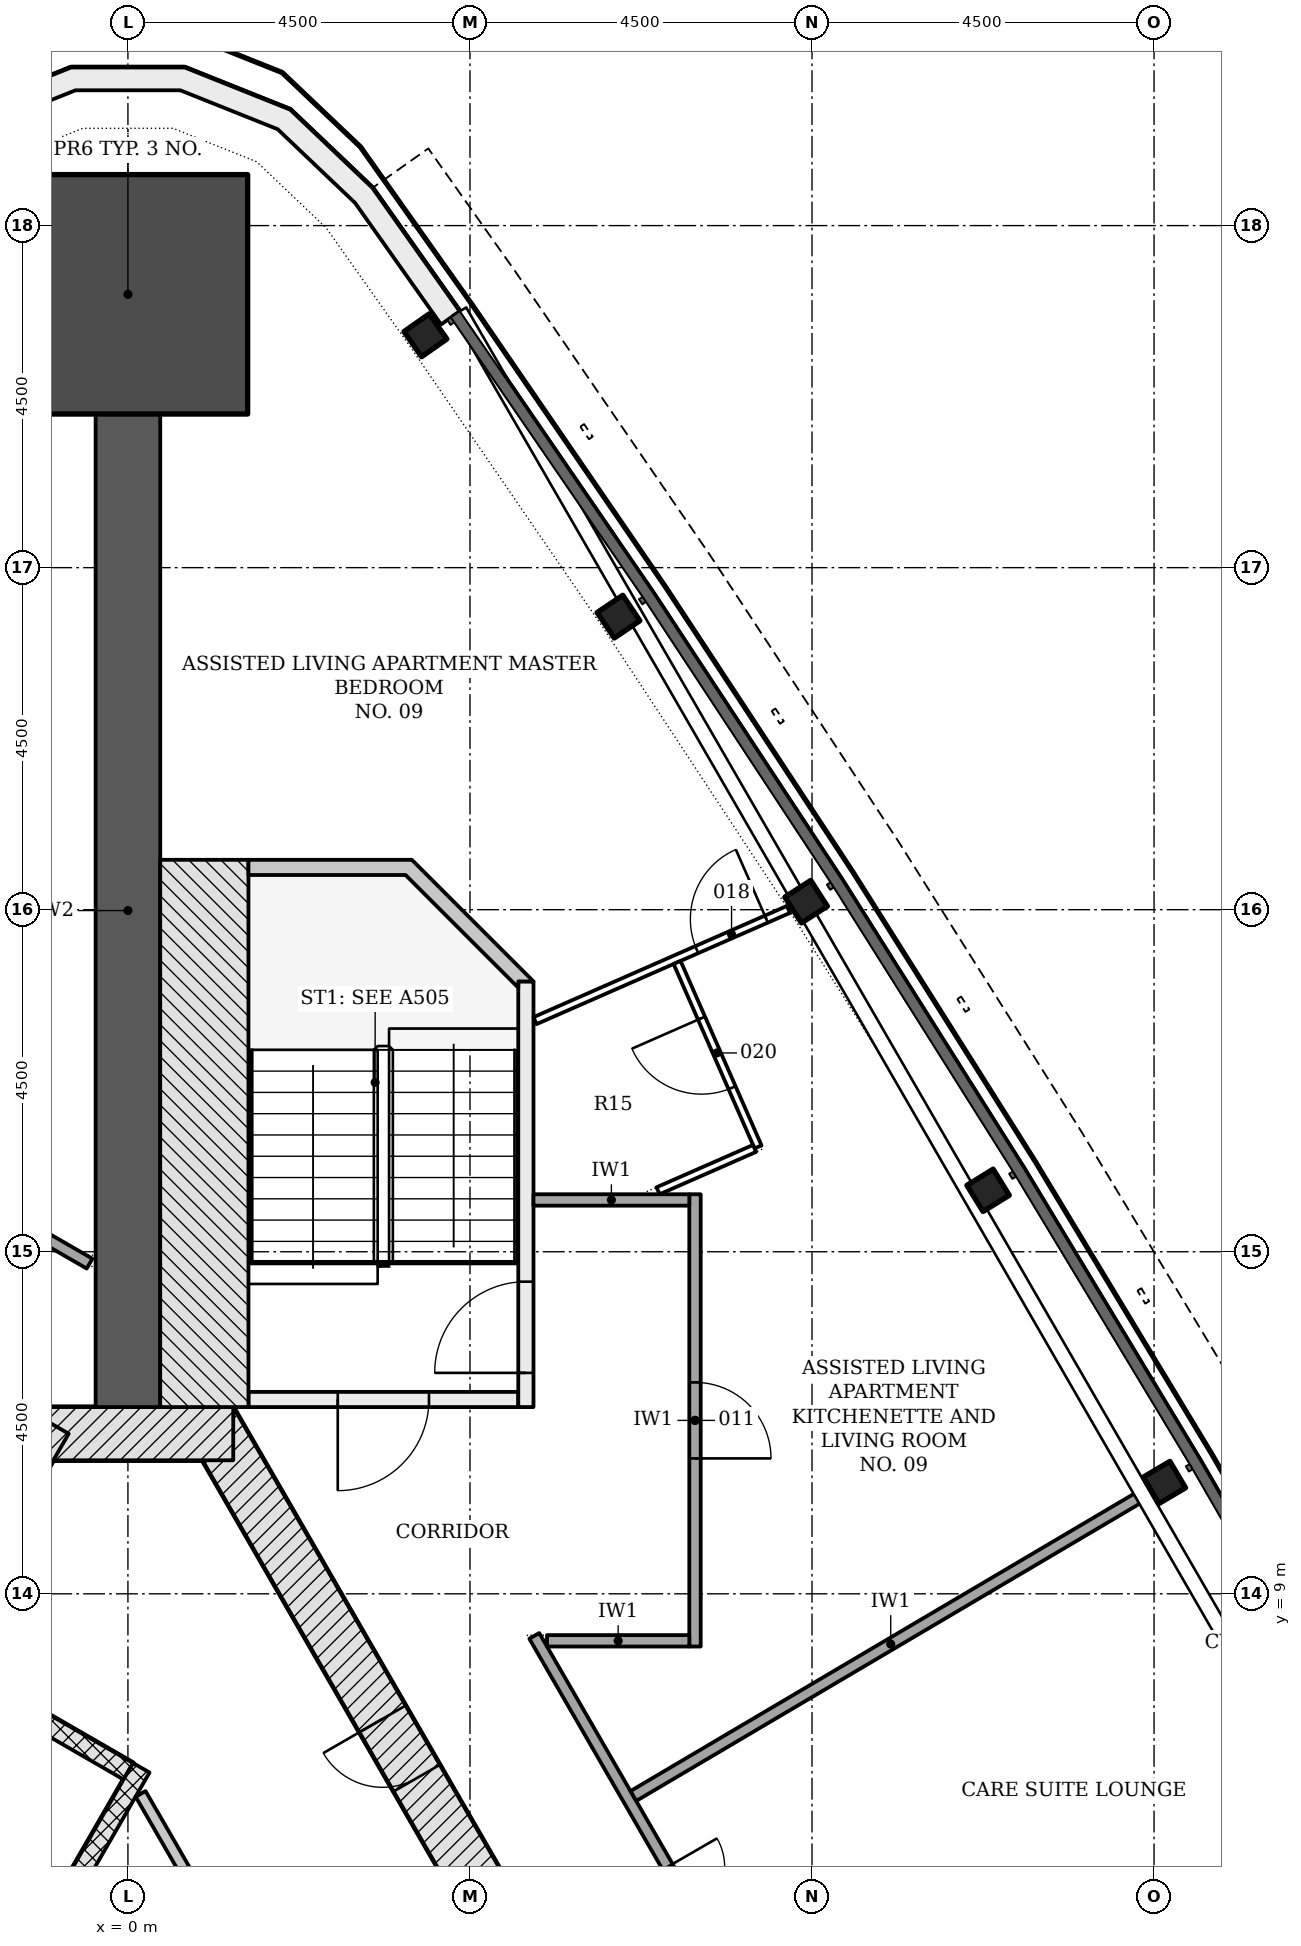
"""IFC4 building model, lengths in metres.
Left out: names, types, materials, properties, quantities, classifications, styles, units other than length and angle.
Written with IfcOpenShell. Run it as: python <this file> out.ifc"""

import sys

from ifc_helpers import new_model, si_unit, direction, frame, frame_2d, origin, origin_2d, place, context, subcontext, project, spatial, polyline, rectangle, i_section, outline, extrude, element, fill, save


model = new_model("IFC4")
c1 = context("Model", 3, precision=1e-05, world=origin(), true_north=direction((0.0, 1.0)))
c2 = subcontext(c1, "Body", "Model", "MODEL_VIEW")
j1 = project(units=[si_unit("LENGTHUNIT", "METRE"), si_unit("PLANEANGLEUNIT", "RADIAN")], contexts=[c1])
p1 = place(None, origin())
s1 = spatial("IfcSite", under=j1, at=p1, CompositionType="ELEMENT")
p2 = place(p1, origin())
s2 = spatial("IfcBuilding", under=s1, at=p2, CompositionType="ELEMENT")
p3 = place(p2, frame((0.0, 0.0, 79.8)))
s3 = spatial("IfcBuildingStorey", under=s2, at=p3, CompositionType="ELEMENT", Elevation=79.8)
p4 = place(p3, frame((10.311, -4.703, -0.2), z_axis=(0.0, 0.0, 1.0), x_axis=(-0.500001446645, 0.866024568562, 0.0)))
e1 = element("IfcWall", 1, at=p4, inside=s3, PredefinedType="SHEAR", context=c2, shape_type="SweptSolid", body=[
    extrude(rectangle(XDim=18.458, YDim=0.7, at=frame_2d((9.229, 0.0))), origin(), (0.0, 0.0, 1.0), 3.6),
])
p5 = place(p4, frame((5.9, 0.0, 0.2)))
e2 = element("IfcOpeningElement", 2, at=p5, cuts=e1, PredefinedType="OPENING", context=c2, shape_type="SweptSolid", body=[
    extrude(rectangle(XDim=1.0, YDim=2.1, at=frame_2d((0.5, 1.05))), frame((0.0, 0.36, 0.0), z_axis=(0.0, -1.0, 0.0), x_axis=(1.0, 0.0, 0.0)), (0.0, 0.0, 1.0), 0.72),
])
p6 = place(p4, frame((1.452, 0.0, 0.2)))
e3 = element("IfcOpeningElement", 3, at=p6, cuts=e1, PredefinedType="OPENING", context=c2, shape_type="SweptSolid", body=[
    extrude(rectangle(XDim=0.9, YDim=2.1, at=frame_2d((0.45, 1.05))), frame((0.0, 0.36, 0.0), z_axis=(0.0, -1.0, 0.0), x_axis=(1.0, 0.0, 0.0)), (0.0, 0.0, 1.0), 0.72),
])
p7 = place(p4, frame((4.396, 0.0, 0.2)))
e4 = element("IfcOpeningElement", 4, at=p7, cuts=e1, PredefinedType="OPENING", context=c2, shape_type="SweptSolid", body=[
    extrude(rectangle(XDim=0.9, YDim=2.1, at=frame_2d((0.45, 1.05))), frame((0.0, 0.36, 0.0), z_axis=(0.0, -1.0, 0.0), x_axis=(1.0, 0.0, 0.0)), (0.0, 0.0, 1.0), 0.72),
])
p8 = place(p4, frame((13.023, 0.0, 0.2)))
e5 = element("IfcOpeningElement", 5, at=p8, cuts=e1, PredefinedType="OPENING", context=c2, shape_type="SweptSolid", body=[
    extrude(rectangle(XDim=0.9, YDim=2.1, at=frame_2d((0.45, 1.05))), frame((0.0, 0.36, 0.0), z_axis=(0.0, -1.0, 0.0), x_axis=(1.0, 0.0, 0.0)), (0.0, 0.0, 1.0), 0.72),
])
p9 = place(p3, frame((1.386, 11.106, -0.2), z_axis=(0.0, 0.0, 1.0), x_axis=(-1.0, 0.0, 0.0)))
e6 = element("IfcWall", 6, at=p9, inside=s3, PredefinedType="SHEAR", context=c2, shape_type="SweptSolid", body=[
    extrude(rectangle(XDim=2.771, YDim=0.7, at=frame_2d((1.386, 0.0))), origin(), (0.0, 0.0, 1.0), 3.6),
])
p10 = place(p3, frame((-1.083, 11.281, -0.2), z_axis=(0.0, 0.0, 1.0), x_axis=(-0.500001446645, -0.866024568562, 0.0)))
e7 = element("IfcWall", 7, at=p10, inside=s3, PredefinedType="SHEAR", context=c2, shape_type="SweptSolid", body=[
    extrude(rectangle(XDim=18.458, YDim=0.7, at=frame_2d((9.229, 0.0))), origin(), (0.0, 0.0, 1.0), 3.6),
])
p11 = place(p10, frame((8.979, 0.0, 0.2)))
e8 = element("IfcOpeningElement", 8, at=p11, cuts=e7, PredefinedType="OPENING", context=c2, shape_type="SweptSolid", body=[
    extrude(rectangle(XDim=1.2, YDim=2.1, at=frame_2d((0.6, 1.05))), frame((0.0, 0.36, 0.0), z_axis=(0.0, -1.0, 0.0), x_axis=(1.0, 0.0, 0.0)), (0.0, 0.0, 1.0), 0.72),
])
p12 = place(p10, frame((11.029, 0.0, 0.2)))
e9 = element("IfcOpeningElement", 9, at=p12, cuts=e7, PredefinedType="OPENING", context=c2, shape_type="SweptSolid", body=[
    extrude(rectangle(XDim=1.2, YDim=2.1, at=frame_2d((0.6, 1.05))), frame((0.0, 0.36, 0.0), z_axis=(0.0, -1.0, 0.0), x_axis=(1.0, 0.0, 0.0)), (0.0, 0.0, 1.0), 0.72),
])
p13 = place(p3, frame((0.0, 11.456, -0.2), z_axis=(0.0, 0.0, 1.0), x_axis=(0.0, 1.0, 0.0)))
e10 = element("IfcWall", 10, at=p13, inside=s3, PredefinedType="SHEAR", context=c2, shape_type="SweptSolid", body=[
    extrude(rectangle(XDim=13.065, YDim=0.85, at=frame_2d((6.532, 0.0))), origin(), (0.0, 0.0, 1.0), 3.6),
])
p14 = place(p3, frame((0.0, 26.096, -0.2), z_axis=(0.0, 0.0, 1.0), x_axis=(0.0, 1.0, 0.0)))
e11 = element("IfcColumn", 11, at=p14, inside=s3, PredefinedType="COLUMN", context=c2, shape_type="SweptSolid", body=[
    extrude(rectangle(XDim=3.15, YDim=3.15, at=origin_2d()), origin(), (0.0, 0.0, 1.0), 3.6),
])
for number, where, z_axis, x_axis in (
    (12, (13.636, 10.465, -0.2), (0.0, 0.0, 1.0), (-0.508, 0.861, 0.0)),
    (13, (11.316, 14.308, -0.2), (0.0, 0.0, 1.0), (-0.525, 0.851, 0.0)),
    (14, (8.922, 18.105, -0.2), (0.0, 0.0, 1.0), (-0.542, 0.841, 0.0)),
    (15, (6.454, 21.855, -0.2), (0.0, 0.0, 1.0), (-0.558, 0.83, 0.0)),
    (16, (3.914, 25.557, -0.2), (0.0, 0.0, 1.0), (-0.574, 0.819, 0.0)),
):
    element("IfcColumn", number, at=place(p3, frame(where, z_axis=z_axis, x_axis=x_axis)), inside=s3, PredefinedType="COLUMN", context=c2, shape_type="SweptSolid", body=[
        extrude(i_section(OverallWidth=0.404, OverallDepth=0.406, WebThickness=0.027, FlangeThickness=0.044, FilletRadius=0.015, at=origin_2d()), origin(), (0.0, 0.0, 1.0), 3.6),
    ])
p15 = place(p3, origin())
e17 = element("IfcWall", 17, at=p15, inside=s3, PredefinedType="NOTDEFINED", context=c2, shape_type="SweptSolid", body=[
    extrude(outline(polyline([(4.364, 25.873), (3.217, 27.495), (2.135, 28.525), (0.747, 29.08), (-0.747, 29.08), (-2.135, 28.525), (-3.217, 27.495), (-4.364, 25.873), (-4.119, 25.699), (-2.989, 27.298), (-1.969, 28.268), (-0.689, 28.78), (0.689, 28.78), (1.969, 28.268), (2.989, 27.298), (4.119, 25.699), (4.364, 25.873)])), origin(), (0.0, 0.0, 1.0), 3.3),
])
p16 = place(p3, frame((-2.506, 8.115, -0.2), z_axis=(0.0, 0.0, 1.0), x_axis=(0.865996321171, -0.50005036918, 0.0)))
e18 = element("IfcWall", 18, at=p16, inside=s3, PredefinedType="PARTITIONING", context=c2, shape_type="SweptSolid", body=[
    extrude(rectangle(XDim=2.9, YDim=0.25, at=frame_2d((1.45, 0.0))), origin(), (0.0, 0.0, 1.0), 3.6),
])
p17 = place(p3, frame((0.176, 6.711, 0.0), z_axis=(0.0, 0.0, 1.0), x_axis=(-0.500004227369, -0.866022963098, 0.0)))
e19 = element("IfcWall", 19, at=p17, inside=s3, PredefinedType="PARTITIONING", context=c2, shape_type="SweptSolid", body=[
    extrude(rectangle(XDim=11.8, YDim=0.25, at=frame_2d((5.9, 0.0))), origin(), (0.0, 0.0, 1.0), 3.4),
])
p18 = place(p3, frame((3.722, 0.21, 0.0), z_axis=(0.0, 0.0, 1.0), x_axis=(-0.500005825834, 0.866022040212, 0.0)))
e20 = element("IfcWall", 20, at=p18, inside=s3, PredefinedType="PARTITIONING", context=c2, shape_type="SweptSolid", body=[
    extrude(rectangle(XDim=7.11, YDim=0.15, at=frame_2d((3.555, 0.0))), origin(), (0.0, 0.0, 1.0), 3.4),
])
p19 = place(p3, frame((5.135, 11.556, -0.2), z_axis=(0.0, 0.0, 1.0), x_axis=(-1.0, 0.0, 0.0)))
e21 = element("IfcWall", 21, at=p19, inside=s3, PredefinedType="SHEAR", context=c2, shape_type="SweptSolid", body=[
    extrude(rectangle(XDim=3.55, YDim=0.2, at=frame_2d((1.775, 0.0))), origin(), (0.0, 0.0, 1.0), 3.6),
])
p20 = place(p19, frame((1.175, 0.0, 0.2)))
e22 = element("IfcOpeningElement", 22, at=p20, cuts=e21, PredefinedType="OPENING", context=c2, shape_type="SweptSolid", body=[
    extrude(rectangle(XDim=1.2, YDim=2.1, at=frame_2d((0.6, 1.05))), frame((0.0, 0.11, 0.0), z_axis=(0.0, -1.0, 0.0), x_axis=(1.0, 0.0, 0.0)), (0.0, 0.0, 1.0), 0.22),
])
p21 = place(p3, frame((5.236, 11.456, -0.2), z_axis=(0.0, 0.0, 1.0), x_axis=(0.0, 1.0, 0.0)))
e23 = element("IfcWall", 23, at=p21, inside=s3, PredefinedType="SHEAR", context=c2, shape_type="SweptSolid", body=[
    extrude(rectangle(XDim=5.6, YDim=0.2, at=frame_2d((2.8, 0.0))), origin(), (0.0, 0.0, 1.0), 3.6),
])
p22 = place(p21, frame((0.45, 0.0, 0.2)))
e24 = element("IfcOpeningElement", 24, at=p22, cuts=e23, PredefinedType="OPENING", context=c2, shape_type="SweptSolid", body=[
    extrude(rectangle(XDim=1.2, YDim=2.1, at=frame_2d((0.6, 1.05))), frame((0.0, 0.11, 0.0), z_axis=(0.0, -1.0, 0.0), x_axis=(1.0, 0.0, 0.0)), (0.0, 0.0, 1.0), 0.22),
])
p23 = place(p3, frame((1.005, 11.456, -0.2), z_axis=(0.0, 0.0, 1.0), x_axis=(0.0, 1.0, 0.0)))
e25 = element("IfcWall", 25, at=p23, inside=s3, PredefinedType="SHEAR", context=c2, shape_type="SweptSolid", body=[
    extrude(rectangle(XDim=7.2, YDim=1.161, at=frame_2d((3.6, 0.0))), origin(), (0.0, 0.0, 1.0), 3.6),
])
p24 = place(p3, frame((0.0, 0.0, -0.2)))
e26 = element("IfcWall", 26, at=p24, inside=s3, PredefinedType="SHEAR", context=c2, shape_type="SweptSolid", body=[
    extrude(outline(polyline([(5.336, 17.056), (3.736, 18.656), (1.586, 18.656), (1.586, 18.456), (3.653, 18.456), (5.135, 16.974), (5.135, 17.056), (5.135, 17.056), (5.135, 17.056), (5.135, 17.056), (5.135, 17.056), (5.135, 17.056), (5.135, 17.056), (5.135, 17.056), (5.135, 17.056), (5.135, 17.056), (5.135, 17.056), (5.135, 17.056), (5.135, 17.056), (5.135, 17.056), (5.135, 17.056), (5.135, 17.056), (5.135, 17.056), (5.336, 17.056)])), origin(), (0.0, 0.0, 1.0), 3.6),
])
p25 = place(p3, frame((5.346, 8.446, 0.0), z_axis=(0.0, 0.0, 1.0), x_axis=(0.500008781656, -0.866020333634, 0.0)))
e27 = element("IfcWall", 27, at=p25, inside=s3, PredefinedType="PARTITIONING", context=c2, shape_type="SweptSolid", body=[
    extrude(rectangle(XDim=15.057, YDim=0.15, at=frame_2d((7.528, 0.0))), origin(), (0.0, 0.0, 1.0), 2.778),
])
p26 = place(p25, frame((12.552, 0.0, 0.0)))
e28 = element("IfcOpeningElement", 28, at=p26, cuts=e27, PredefinedType="OPENING", context=c2, shape_type="SweptSolid", body=[
    extrude(rectangle(XDim=1.0, YDim=2.1, at=frame_2d((0.5, 1.05))), frame((0.0, 0.085, 0.0), z_axis=(0.0, -1.0, 0.0), x_axis=(1.0, 0.0, 0.0)), (0.0, 0.0, 1.0), 0.17),
])
p27 = place(p25, frame((9.365, 0.0, 0.0)))
e29 = element("IfcOpeningElement", 29, at=p27, cuts=e27, PredefinedType="OPENING", context=c2, shape_type="SweptSolid", body=[
    extrude(rectangle(XDim=1.0, YDim=2.1, at=frame_2d((0.5, 1.05))), frame((0.0, 0.085, 0.0), z_axis=(0.0, -1.0, 0.0), x_axis=(1.0, 0.0, 0.0)), (0.0, 0.0, 1.0), 0.17),
])
p28 = place(p25, frame((6.816, 0.0, 0.0)))
e30 = element("IfcOpeningElement", 30, at=p28, cuts=e27, PredefinedType="OPENING", context=c2, shape_type="SweptSolid", body=[
    extrude(rectangle(XDim=1.0, YDim=2.1, at=frame_2d((0.5, 1.05))), frame((0.0, 0.085, 0.0), z_axis=(0.0, -1.0, 0.0), x_axis=(1.0, 0.0, 0.0)), (0.0, 0.0, 1.0), 0.17),
])
p29 = place(p25, frame((3.509, 0.0, 0.0)))
e31 = element("IfcOpeningElement", 31, at=p29, cuts=e27, PredefinedType="OPENING", context=c2, shape_type="SweptSolid", body=[
    extrude(rectangle(XDim=1.5, YDim=2.1, at=frame_2d((0.75, 1.05))), frame((0.0, 0.085, 0.0), z_axis=(0.0, -1.0, 0.0), x_axis=(1.0, 0.0, 0.0)), (0.0, 0.0, 1.0), 0.17),
])
p30 = place(p3, frame((7.461, 14.256, 0.0), z_axis=(0.0, 0.0, 1.0), x_axis=(0.0, -1.0, 0.0)))
e32 = element("IfcWall", 32, at=p30, inside=s3, PredefinedType="PARTITIONING", context=c2, shape_type="SweptSolid", body=[
    extrude(rectangle(XDim=5.95, YDim=0.15, at=frame_2d((2.975, 0.0))), origin(), (0.0, 0.0, 1.0), 2.778),
])
p31 = place(p30, frame((2.475, 0.0, 0.0)))
e33 = element("IfcOpeningElement", 33, at=p31, cuts=e32, PredefinedType="OPENING", context=c2, shape_type="SweptSolid", body=[
    extrude(rectangle(XDim=1.0, YDim=2.1, at=frame_2d((0.5, 1.05))), frame((0.0, 0.085, 0.0), z_axis=(0.0, -1.0, 0.0), x_axis=(1.0, 0.0, 0.0)), (0.0, 0.0, 1.0), 0.17),
])
p32 = place(p3, frame((-5.111, 16.003, 0.0), z_axis=(0.0, 0.0, 1.0), x_axis=(0.866034245675, -0.499984685083, 0.0)))
e34 = element("IfcWall", 34, at=p32, inside=s3, PredefinedType="PARTITIONING", context=c2, shape_type="SweptSolid", body=[
    extrude(rectangle(XDim=5.319, YDim=0.15, at=frame_2d((2.66, 0.0))), origin(), (0.0, 0.0, 1.0), 3.4),
])
p33 = place(p32, frame((1.834, 0.0, 0.0)))
e35 = element("IfcOpeningElement", 35, at=p33, cuts=e34, PredefinedType="OPENING", context=c2, shape_type="SweptSolid", body=[
    extrude(rectangle(XDim=1.5, YDim=2.1, at=frame_2d((0.75, 1.05))), frame((0.0, 0.085, 0.0), z_axis=(0.0, -1.0, 0.0), x_axis=(1.0, 0.0, 0.0)), (0.0, 0.0, 1.0), 0.17),
])
p34 = place(p3, frame((5.336, 14.181, 0.0), z_axis=(0.0, 0.0, 1.0), x_axis=(1.0, 0.0, 0.0)))
e36 = element("IfcWall", 36, at=p34, inside=s3, PredefinedType="PARTITIONING", context=c2, shape_type="SweptSolid", body=[
    extrude(rectangle(XDim=2.05, YDim=0.15, at=frame_2d((1.025, 0.0))), origin(), (0.0, 0.0, 1.0), 3.4),
])
p35 = place(p3, frame((5.514, 8.381, 0.0), z_axis=(0.0, 0.0, 1.0), x_axis=(1.0, 0.0, 0.0)))
e37 = element("IfcWall", 37, at=p35, inside=s3, PredefinedType="PARTITIONING", context=c2, shape_type="SweptSolid", body=[
    extrude(rectangle(XDim=1.872, YDim=0.15, at=frame_2d((0.936, 0.0))), origin(), (0.0, 0.0, 1.0), 3.4),
])
p36 = place(p3, frame((13.421, 10.338, 0.0), z_axis=(0.0, 0.0, 1.0), x_axis=(-0.861114991514, -0.508410239266, 0.0)))
e38 = element("IfcWall", 38, at=p36, inside=s3, PredefinedType="PARTITIONING", context=c2, shape_type="SweptSolid", body=[
    extrude(rectangle(XDim=7.863, YDim=0.15, at=frame_2d((3.932, 0.0))), origin(), (0.0, 0.0, 1.0), 2.778),
])
p37 = place(p3, frame((5.356, 16.54, 0.0), z_axis=(0.0, 0.0, 1.0), x_axis=(0.915687364234, 0.401891342258, 0.0)))
e39 = element("IfcWall", 39, at=p37, inside=s3, PredefinedType="PARTITIONING", context=c2, shape_type="SweptSolid", body=[
    extrude(rectangle(XDim=3.641, YDim=0.1, at=frame_2d((1.821, 0.0))), origin(), (0.0, 0.0, 1.0), 2.923),
])
p38 = place(p37, frame((2.324, 0.0, 0.0)))
e40 = element("IfcOpeningElement", 40, at=p38, cuts=e39, PredefinedType="OPENING", context=c2, shape_type="SweptSolid", body=[
    extrude(rectangle(XDim=1.0, YDim=2.1, at=frame_2d((0.5, 1.05))), frame((0.0, 0.06, 0.0), z_axis=(0.0, -1.0, 0.0), x_axis=(1.0, 0.0, 0.0)), (0.0, 0.0, 1.0), 0.12),
])
p39 = place(p3, frame((8.29, 14.879, 0.0), z_axis=(0.0, 0.0, 1.0), x_axis=(-0.401954267375, 0.915659744085, 0.0)))
e41 = element("IfcWall", 41, at=p39, inside=s3, PredefinedType="PARTITIONING", context=c2, shape_type="SweptSolid", body=[
    extrude(rectangle(XDim=2.65, YDim=0.1, at=frame_2d((1.325, 0.0))), origin(), (0.0, 0.0, 1.0), 2.923),
])
p40 = place(p39, frame((0.85, 0.0, 0.0)))
e42 = element("IfcOpeningElement", 42, at=p40, cuts=e41, PredefinedType="OPENING", context=c2, shape_type="SweptSolid", body=[
    extrude(rectangle(XDim=1.0, YDim=2.1, at=frame_2d((0.5, 1.05))), frame((0.0, 0.06, 0.0), z_axis=(0.0, -1.0, 0.0), x_axis=(1.0, 0.0, 0.0)), (0.0, 0.0, 1.0), 0.12),
])
p41 = place(p3, frame((6.975, 14.302, 0.0), z_axis=(0.0, 0.0, 1.0), x_axis=(0.915740462341, 0.401770339412, 0.0)))
e43 = element("IfcWall", 43, at=p41, inside=s3, PredefinedType="PARTITIONING", context=c2, shape_type="SweptSolid", body=[
    extrude(rectangle(XDim=1.386, YDim=0.1, at=frame_2d((0.693, 0.0))), origin(), (0.0, 0.0, 1.0), 3.4),
])
p42 = place(p8, origin())
e44 = element("IfcDoor", 44, at=p42, inside=s3, OperationType="SINGLE_SWING_RIGHT", PredefinedType="DOOR", context=c2, shape_type="SweptSolid", body=[
    extrude(rectangle(XDim=0.9, YDim=2.1, at=frame_2d((0.45, 1.05))), frame((0.0, 0.075, 0.0), z_axis=(0.0, -1.0, 0.0), x_axis=(1.0, 0.0, 0.0)), (0.0, 0.0, 1.0), 0.15),
])
fill(e5, e44)
p43 = place(p20, origin())
e45 = element("IfcDoor", 45, at=p43, inside=s3, OperationType="SINGLE_SWING_RIGHT", PredefinedType="DOOR", context=c2, shape_type="SweptSolid", body=[
    extrude(rectangle(XDim=1.2, YDim=2.1, at=frame_2d((0.6, 1.05))), frame((0.0, 0.025, 0.0), z_axis=(0.0, -1.0, 0.0), x_axis=(1.0, 0.0, 0.0)), (0.0, 0.0, 1.0), 0.05),
])
fill(e22, e45)
p44 = place(p22, origin())
e46 = element("IfcDoor", 46, at=p44, inside=s3, OperationType="SINGLE_SWING_LEFT", PredefinedType="DOOR", context=c2, shape_type="SweptSolid", body=[
    extrude(rectangle(XDim=1.2, YDim=2.1, at=frame_2d((0.6, 1.05))), frame((0.0, 0.025, 0.0), z_axis=(0.0, -1.0, 0.0), x_axis=(1.0, 0.0, 0.0)), (0.0, 0.0, 1.0), 0.05),
])
fill(e24, e46)
p45 = place(p29, origin())
e47 = element("IfcDoor", 47, at=p45, inside=s3, OperationType="DOUBLE_DOOR_SINGLE_SWING", PredefinedType="DOOR", context=c2, shape_type="SweptSolid", body=[
    extrude(rectangle(XDim=1.5, YDim=2.1, at=frame_2d((0.75, 1.05))), frame((0.0, 0.025, 0.0), z_axis=(0.0, -1.0, 0.0), x_axis=(1.0, 0.0, 0.0)), (0.0, 0.0, 1.0), 0.05),
])
fill(e31, e47)
p46 = place(p31, origin())
e48 = element("IfcDoor", 48, at=p46, inside=s3, OperationType="SINGLE_SWING_RIGHT", PredefinedType="DOOR", context=c2, shape_type="SweptSolid", body=[
    extrude(rectangle(XDim=1.0, YDim=2.1, at=frame_2d((0.5, 1.05))), frame((0.0, 0.025, 0.0), z_axis=(0.0, -1.0, 0.0), x_axis=(1.0, 0.0, 0.0)), (0.0, 0.0, 1.0), 0.05),
])
fill(e33, e48)
p47 = place(p38, origin())
e49 = element("IfcDoor", 49, at=p47, inside=s3, OperationType="SINGLE_SWING_RIGHT", PredefinedType="DOOR", context=c2, shape_type="SweptSolid", body=[
    extrude(rectangle(XDim=1.0, YDim=2.1, at=frame_2d((0.5, 1.05))), frame((0.0, 0.025, 0.0), z_axis=(0.0, -1.0, 0.0), x_axis=(1.0, 0.0, 0.0)), (0.0, 0.0, 1.0), 0.05),
])
fill(e40, e49)
p48 = place(p40, origin())
e50 = element("IfcDoor", 50, at=p48, inside=s3, OperationType="SINGLE_SWING_RIGHT", PredefinedType="DOOR", context=c2, shape_type="SweptSolid", body=[
    extrude(rectangle(XDim=1.0, YDim=2.1, at=frame_2d((0.5, 1.05))), frame((0.0, 0.025, 0.0), z_axis=(0.0, -1.0, 0.0), x_axis=(1.0, 0.0, 0.0)), (0.0, 0.0, 1.0), 0.05),
])
fill(e42, e50)
save(model, sys.argv[1])
